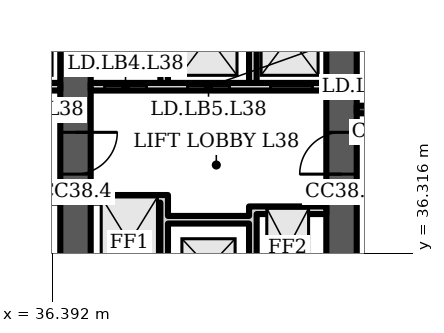
"""IFC4 building model, lengths in metres.
Left out: names, types, materials, properties, quantities, classifications, styles, units other than length and angle.
Written with IfcOpenShell. Run it as: python <this file> out.ifc"""

import sys

from ifc_helpers import new_model, si_unit, direction, frame, frame_2d, origin, place, context, subcontext, project, spatial, polyline, rectangle, outline, extrude, element, fill, save


model = new_model("IFC4")
c1 = context("Model", 3, precision=1e-05, world=origin(), true_north=direction((0.0, 1.0)))
c2 = subcontext(c1, "Body", "Model", "MODEL_VIEW")
j1 = project(units=[si_unit("LENGTHUNIT", "METRE"), si_unit("PLANEANGLEUNIT", "RADIAN")], contexts=[c1])
p1 = place(None, origin())
s1 = spatial("IfcSite", under=j1, at=p1, CompositionType="ELEMENT")
p2 = place(p1, origin())
s2 = spatial("IfcBuilding", under=s1, at=p2, CompositionType="ELEMENT")
p3 = place(p2, frame((0.0, 0.0, 159.1)))
s3 = spatial("IfcBuildingStorey", under=s2, at=p3, CompositionType="ELEMENT", Elevation=159.1)
p4 = place(p3, frame((37.0, 34.8, 0.0), z_axis=(0.0, 0.0, 1.0), x_axis=(0.0, 1.0, 0.0)))
e1 = element("IfcWall", 1, at=p4, inside=s3, PredefinedType="SHEAR", context=c2, shape_type="SweptSolid", body=[
    extrude(rectangle(XDim=14.987, YDim=0.8, at=frame_2d((7.493, 0.0))), origin(), (0.0, 0.0, 1.0), 3.6),
])
p5 = place(p4, frame((11.312, 0.0, 0.0)))
e2 = element("IfcOpeningElement", 2, at=p5, cuts=e1, PredefinedType="OPENING", context=c2, shape_type="SweptSolid", body=[
    extrude(rectangle(XDim=1.0, YDim=2.1, at=frame_2d((0.5, 1.05))), frame((0.0, 0.41, 0.0), z_axis=(0.0, -1.0, 0.0), x_axis=(1.0, 0.0, 0.0)), (0.0, 0.0, 1.0), 0.82),
])
p6 = place(p4, frame((3.6, 0.0, 0.0)))
e3 = element("IfcOpeningElement", 3, at=p6, cuts=e1, PredefinedType="OPENING", context=c2, shape_type="SweptSolid", body=[
    extrude(rectangle(XDim=1.1, YDim=2.1, at=frame_2d((0.55, 1.05))), frame((0.0, 0.41, 0.0), z_axis=(0.0, -1.0, 0.0), x_axis=(1.0, 0.0, 0.0)), (0.0, 0.0, 1.0), 0.82),
])
p7 = place(p3, frame((44.0, 34.8, 0.0), z_axis=(0.0, 0.0, 1.0), x_axis=(0.0, 1.0, 0.0)))
e4 = element("IfcWall", 4, at=p7, inside=s3, PredefinedType="SHEAR", context=c2, shape_type="SweptSolid", body=[
    extrude(rectangle(XDim=14.374, YDim=0.8, at=frame_2d((7.187, 0.0))), origin(), (0.0, 0.0, 1.0), 3.6),
])
p8 = place(p7, frame((11.312, 0.0, 0.0)))
e5 = element("IfcOpeningElement", 5, at=p8, cuts=e4, PredefinedType="OPENING", context=c2, shape_type="SweptSolid", body=[
    extrude(rectangle(XDim=1.0, YDim=2.1, at=frame_2d((0.5, 1.05))), frame((0.0, 0.41, 0.0), z_axis=(0.0, -1.0, 0.0), x_axis=(1.0, 0.0, 0.0)), (0.0, 0.0, 1.0), 0.82),
])
p9 = place(p7, frame((3.6, 0.0, 0.0)))
e6 = element("IfcOpeningElement", 6, at=p9, cuts=e4, PredefinedType="OPENING", context=c2, shape_type="SweptSolid", body=[
    extrude(rectangle(XDim=1.1, YDim=2.1, at=frame_2d((0.55, 1.05))), frame((0.0, 0.41, 0.0), z_axis=(0.0, -1.0, 0.0), x_axis=(1.0, 0.0, 0.0)), (0.0, 0.0, 1.0), 0.82),
])
p10 = place(p3, frame((30.4, 40.7, 0.0), z_axis=(0.0, 0.0, 1.0), x_axis=(1.0, 0.0, 0.0)))
e7 = element("IfcWall", 7, at=p10, inside=s3, PredefinedType="PARTITIONING", context=c2, shape_type="SweptSolid", body=[
    extrude(rectangle(XDim=6.2, YDim=0.2, at=frame_2d((3.1, 0.0))), origin(), (0.0, 0.0, 1.0), 3.2),
])
p11 = place(p10, frame((0.367, 0.0, 0.0)))
e8 = element("IfcOpeningElement", 8, at=p11, cuts=e7, PredefinedType="OPENING", context=c2, shape_type="SweptSolid", body=[
    extrude(rectangle(XDim=1.1, YDim=2.1, at=frame_2d((0.55, 1.05))), frame((0.0, 0.11, 0.0), z_axis=(0.0, -1.0, 0.0), x_axis=(1.0, 0.0, 0.0)), (0.0, 0.0, 1.0), 0.22),
])
p12 = place(p10, frame((2.55, 0.0, 0.0)))
e9 = element("IfcOpeningElement", 9, at=p12, cuts=e7, PredefinedType="OPENING", context=c2, shape_type="SweptSolid", body=[
    extrude(rectangle(XDim=1.1, YDim=2.1, at=frame_2d((0.55, 1.05))), frame((0.0, 0.11, 0.0), z_axis=(0.0, -1.0, 0.0), x_axis=(1.0, 0.0, 0.0)), (0.0, 0.0, 1.0), 0.22),
])
p13 = place(p10, frame((4.733, 0.0, 0.0)))
e10 = element("IfcOpeningElement", 10, at=p13, cuts=e7, PredefinedType="OPENING", context=c2, shape_type="SweptSolid", body=[
    extrude(rectangle(XDim=1.1, YDim=2.1, at=frame_2d((0.55, 1.05))), frame((0.0, 0.11, 0.0), z_axis=(0.0, -1.0, 0.0), x_axis=(1.0, 0.0, 0.0)), (0.0, 0.0, 1.0), 0.22),
])
p14 = place(p3, frame((0.0, 0.0, -0.0)))
e11 = element("IfcWall", 11, at=p14, inside=s3, PredefinedType="PARTITIONING", context=c2, shape_type="SweptSolid", body=[
    extrude(outline(polyline([(34.567, 37.85), (34.767, 37.85), (36.6, 37.85), (36.6, 37.65), (34.767, 37.65), (34.767, 34.8), (34.567, 34.8), (34.567, 37.85)])), origin(), (0.0, 0.0, 1.0), 3.2),
])
p15 = place(p3, frame((0.0, 0.0, -0.0)))
e12 = element("IfcWall", 12, at=p15, inside=s3, PredefinedType="PARTITIONING", context=c2, shape_type="SweptSolid", body=[
    extrude(outline(polyline([(32.433, 40.8), (32.233, 40.8), (32.233, 43.8), (30.4, 43.8), (30.4, 44.0), (36.6, 44.0), (36.6, 43.8), (34.767, 43.8), (34.767, 40.8), (34.567, 40.8), (34.567, 43.8), (32.433, 43.8), (32.433, 40.8)])), origin(), (0.0, 0.0, 1.0), 3.2),
])
p16 = place(p3, frame((37.4, 40.7, 0.0), z_axis=(0.0, 0.0, 1.0), x_axis=(1.0, 0.0, 0.0)))
e13 = element("IfcWall", 13, at=p16, inside=s3, PredefinedType="PARTITIONING", context=c2, shape_type="SweptSolid", body=[
    extrude(rectangle(XDim=6.2, YDim=0.2, at=frame_2d((3.1, 0.0))), origin(), (0.0, 0.0, 1.0), 3.2),
])
p17 = place(p16, frame((0.367, 0.0, 0.0)))
e14 = element("IfcOpeningElement", 14, at=p17, cuts=e13, PredefinedType="OPENING", context=c2, shape_type="SweptSolid", body=[
    extrude(rectangle(XDim=1.1, YDim=2.1, at=frame_2d((0.55, 1.05))), frame((0.0, 0.11, 0.0), z_axis=(0.0, -1.0, 0.0), x_axis=(1.0, 0.0, 0.0)), (0.0, 0.0, 1.0), 0.22),
])
p18 = place(p16, frame((2.55, 0.0, 0.0)))
e15 = element("IfcOpeningElement", 15, at=p18, cuts=e13, PredefinedType="OPENING", context=c2, shape_type="SweptSolid", body=[
    extrude(rectangle(XDim=1.1, YDim=2.1, at=frame_2d((0.55, 1.05))), frame((0.0, 0.11, 0.0), z_axis=(0.0, -1.0, 0.0), x_axis=(1.0, 0.0, 0.0)), (0.0, 0.0, 1.0), 0.22),
])
p19 = place(p16, frame((4.733, 0.0, 0.0)))
e16 = element("IfcOpeningElement", 16, at=p19, cuts=e13, PredefinedType="OPENING", context=c2, shape_type="SweptSolid", body=[
    extrude(rectangle(XDim=1.1, YDim=2.1, at=frame_2d((0.55, 1.05))), frame((0.0, 0.11, 0.0), z_axis=(0.0, -1.0, 0.0), x_axis=(1.0, 0.0, 0.0)), (0.0, 0.0, 1.0), 0.22),
])
p20 = place(p3, frame((0.0, 0.0, -0.0)))
e17 = element("IfcWall", 17, at=p20, inside=s3, PredefinedType="PARTITIONING", context=c2, shape_type="SweptSolid", body=[
    extrude(outline(polyline([(41.567, 37.1), (39.433, 37.1), (39.433, 34.8), (39.233, 34.8), (39.233, 37.65), (37.4, 37.65), (37.4, 37.85), (39.233, 37.85), (39.433, 37.85), (39.433, 37.3), (41.567, 37.3), (41.567, 37.55), (41.767, 37.55), (43.6, 37.55), (43.6, 37.35), (41.767, 37.35), (41.767, 34.8), (41.567, 34.8), (41.567, 37.1)])), origin(), (0.0, 0.0, 1.0), 3.2),
])
p21 = place(p3, frame((0.0, 0.0, -0.0)))
e18 = element("IfcWall", 18, at=p21, inside=s3, PredefinedType="PARTITIONING", context=c2, shape_type="SweptSolid", body=[
    extrude(outline(polyline([(39.433, 40.8), (39.233, 40.8), (39.233, 43.8), (37.4, 43.8), (37.4, 44.0), (43.6, 44.0), (43.6, 43.8), (41.767, 43.8), (41.767, 40.8), (41.567, 40.8), (41.567, 43.8), (39.433, 43.8), (39.433, 40.8)])), origin(), (0.0, 0.0, 1.0), 3.2),
])
p22 = place(p3, frame((44.4, 40.1, 0.0), z_axis=(0.0, 0.0, 1.0), x_axis=(1.0, 0.0, 0.0)))
e19 = element("IfcWall", 19, at=p22, inside=s3, PredefinedType="SHEAR", context=c2, shape_type="SweptSolid", body=[
    extrude(rectangle(XDim=6.2, YDim=0.2, at=frame_2d((3.1, 0.0))), origin(), (0.0, 0.0, 1.0), 3.2),
])
p23 = place(p22, frame((3.525, 0.0, 0.0)))
e20 = element("IfcOpeningElement", 20, at=p23, cuts=e19, PredefinedType="OPENING", context=c2, shape_type="SweptSolid", body=[
    extrude(rectangle(XDim=1.2, YDim=2.1, at=frame_2d((0.6, 1.05))), frame((0.0, 0.11, 0.0), z_axis=(0.0, -1.0, 0.0), x_axis=(1.0, 0.0, 0.0)), (0.0, 0.0, 1.0), 0.22),
])
p24 = place(p22, frame((0.575, 0.0, 0.0)))
e21 = element("IfcOpeningElement", 21, at=p24, cuts=e19, PredefinedType="OPENING", context=c2, shape_type="SweptSolid", body=[
    extrude(rectangle(XDim=0.9, YDim=2.1, at=frame_2d((0.45, 1.05))), frame((0.0, 0.11, 0.0), z_axis=(0.0, -1.0, 0.0), x_axis=(1.0, 0.0, 0.0)), (0.0, 0.0, 1.0), 0.22),
])
p25 = place(p17, origin())
e22 = element("IfcDoor", 22, at=p25, inside=s3, OperationType="DOUBLE_DOOR_SLIDING", PredefinedType="DOOR", context=c2, shape_type="SweptSolid", body=[
    extrude(rectangle(XDim=1.1, YDim=2.1, at=frame_2d((0.55, 1.05))), frame((0.0, 0.025, 0.0), z_axis=(0.0, -1.0, 0.0), x_axis=(1.0, 0.0, 0.0)), (0.0, 0.0, 1.0), 0.05),
])
fill(e14, e22)
p26 = place(p18, origin())
e23 = element("IfcDoor", 23, at=p26, inside=s3, OperationType="DOUBLE_DOOR_SLIDING", PredefinedType="DOOR", context=c2, shape_type="SweptSolid", body=[
    extrude(rectangle(XDim=1.1, YDim=2.1, at=frame_2d((0.55, 1.05))), frame((0.0, 0.025, 0.0), z_axis=(0.0, -1.0, 0.0), x_axis=(1.0, 0.0, 0.0)), (0.0, 0.0, 1.0), 0.05),
])
fill(e15, e23)
p27 = place(p19, origin())
e24 = element("IfcDoor", 24, at=p27, inside=s3, OperationType="DOUBLE_DOOR_SLIDING", PredefinedType="DOOR", context=c2, shape_type="SweptSolid", body=[
    extrude(rectangle(XDim=1.1, YDim=2.1, at=frame_2d((0.55, 1.05))), frame((0.0, 0.025, 0.0), z_axis=(0.0, -1.0, 0.0), x_axis=(1.0, 0.0, 0.0)), (0.0, 0.0, 1.0), 0.05),
])
fill(e16, e24)
p28 = place(p6, origin())
e25 = element("IfcDoor", 25, at=p28, inside=s3, OperationType="SINGLE_SWING_RIGHT", PredefinedType="DOOR", context=c2, shape_type="SweptSolid", body=[
    extrude(rectangle(XDim=1.1, YDim=2.1, at=frame_2d((0.55, 1.05))), frame((0.0, 0.025, 0.0), z_axis=(0.0, -1.0, 0.0), x_axis=(1.0, 0.0, 0.0)), (0.0, 0.0, 1.0), 0.05),
])
fill(e3, e25)
p29 = place(p9, origin())
e26 = element("IfcDoor", 26, at=p29, inside=s3, OperationType="SINGLE_SWING_LEFT", PredefinedType="DOOR", context=c2, shape_type="SweptSolid", body=[
    extrude(rectangle(XDim=1.1, YDim=2.1, at=frame_2d((0.55, 1.05))), frame((0.0, 0.025, 0.0), z_axis=(0.0, -1.0, 0.0), x_axis=(1.0, 0.0, 0.0)), (0.0, 0.0, 1.0), 0.05),
])
fill(e6, e26)
save(model, sys.argv[1])
